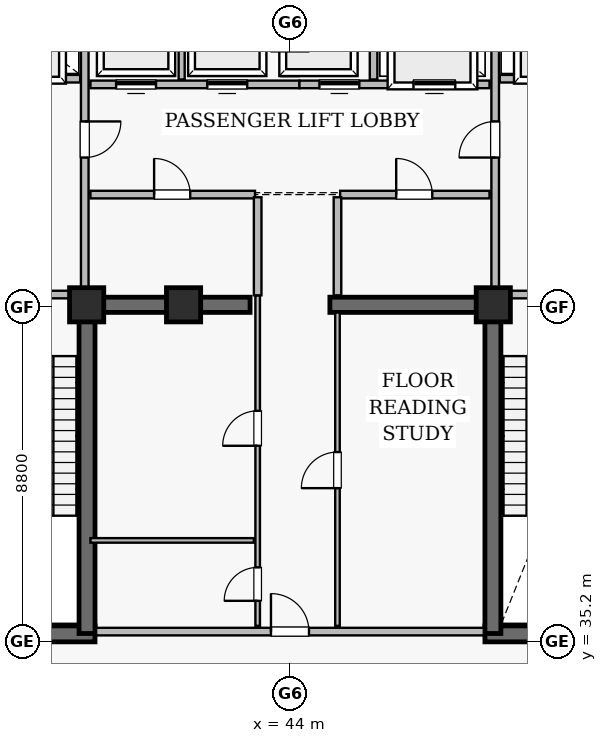
"""IFC4 building model, lengths in metres.
Left out: names, types, materials, properties, quantities, classifications, styles, units other than length and angle.
Written with IfcOpenShell. Run it as: python <this file> out.ifc"""

import sys

from ifc_helpers import new_model, si_unit, direction, frame, frame_2d, origin, origin_2d, place, context, subcontext, project, spatial, rectangle, extrude, element, fill, save


model = new_model("IFC4")
c1 = context("Model", 3, precision=1e-05, world=origin(), true_north=direction((0.0, 1.0)))
c2 = subcontext(c1, "Body", "Model", "MODEL_VIEW")
j1 = project(units=[si_unit("LENGTHUNIT", "METRE"), si_unit("PLANEANGLEUNIT", "RADIAN")], contexts=[c1])
p1 = place(None, origin())
s1 = spatial("IfcSite", under=j1, at=p1, CompositionType="ELEMENT")
p2 = place(p1, origin())
s2 = spatial("IfcBuilding", under=s1, at=p2, CompositionType="ELEMENT")
p3 = place(p2, frame((0.0, 0.0, 289.6)))
s3 = spatial("IfcBuildingStorey", under=s2, at=p3, CompositionType="ELEMENT", Elevation=289.6)
for number, where, z_axis, x_axis in (
    (1, (35.18, 35.39, 0.0), (0.0, 0.0, 1.0), (1.0, 0.0, 0.0)),
    (2, (49.13, 35.39, 0.0), (0.0, 0.0, 1.0), (1.0, 0.0, 0.0)),
):
    element("IfcWall", number, at=place(p3, frame(where, z_axis=z_axis, x_axis=x_axis)), inside=s3, PredefinedType="SHEAR", context=c2, shape_type="SweptSolid", body=[
        extrude(rectangle(XDim=3.69, YDim=0.42, at=frame_2d((1.845, 0.0))), origin(), (0.0, 0.0, 1.0), 5.51),
    ])
for number, where, z_axis, x_axis in (
    (3, (38.66, 35.4, 0.0), (0.0, 0.0, 1.0), (0.0, 1.0, 0.0)),
    (4, (49.34, 35.4, 0.0), (0.0, 0.0, 1.0), (0.0, 1.0, 0.0)),
):
    element("IfcWall", number, at=place(p3, frame(where, z_axis=z_axis, x_axis=x_axis)), inside=s3, PredefinedType="SHEAR", context=c2, shape_type="SweptSolid", body=[
        extrude(rectangle(XDim=8.95, YDim=0.42, at=frame_2d((4.475, 0.0))), origin(), (0.0, 0.0, 1.0), 5.51),
    ])
p4 = place(p3, frame((44.0, 50.1, 0.0), z_axis=(0.0, 0.0, 1.0), x_axis=(0.0, 1.0, 0.0)))
e5 = element("IfcWall", 5, at=p4, inside=s3, PredefinedType="SHEAR", context=c2, shape_type="SweptSolid", body=[
    extrude(rectangle(XDim=2.1, YDim=0.4, at=frame_2d((1.05, 0.0))), origin(), (0.0, 0.0, 1.0), 5.51),
])
for number, where, z_axis, x_axis in (
    (6, (38.75, 44.05, 0.0), (0.0, 0.0, 1.0), (1.0, 0.0, 0.0)),
    (7, (45.05, 44.05, 0.0), (0.0, 0.0, 1.0), (1.0, 0.0, 0.0)),
):
    element("IfcWall", number, at=place(p3, frame(where, z_axis=z_axis, x_axis=x_axis)), inside=s3, PredefinedType="SHEAR", context=c2, shape_type="SweptSolid", body=[
        extrude(rectangle(XDim=4.2, YDim=0.4, at=frame_2d((2.1, 0.0))), origin(), (0.0, 0.0, 1.0), 5.51),
    ])
for number, where, z_axis, x_axis in (
    (8, (38.65, 44.05, 0.0), (0.0, 0.0, 1.0), (1.0, 0.0, 0.0)),
    (9, (49.35, 44.05, 0.0), (0.0, 0.0, 1.0), (1.0, 0.0, 0.0)),
    (10, (41.2, 44.05, 0.0), (0.0, 0.0, 1.0), (1.0, 0.0, 0.0)),
):
    element("IfcColumn", number, at=place(p3, frame(where, z_axis=z_axis, x_axis=x_axis)), inside=s3, PredefinedType="COLUMN", context=c2, shape_type="SweptSolid", body=[
        extrude(rectangle(XDim=0.9, YDim=0.9, at=origin_2d()), origin(), (0.0, 0.0, 1.0), 5.8),
    ])
p5 = place(p3, frame((38.9, 35.45, 0.0), z_axis=(0.0, 0.0, 1.0), x_axis=(1.0, 0.0, 0.0)))
e11 = element("IfcWall", 11, at=p5, inside=s3, PredefinedType="SOLIDWALL", context=c2, shape_type="SweptSolid", body=[
    extrude(rectangle(XDim=10.2, YDim=0.2, at=frame_2d((5.1, 0.0))), origin(), (0.0, 0.0, 1.0), 5.51),
])
p6 = place(p5, frame((4.6, 0.0, 0.0)))
e12 = element("IfcOpeningElement", 12, at=p6, cuts=e11, PredefinedType="OPENING", context=c2, shape_type="SweptSolid", body=[
    extrude(rectangle(XDim=1.0, YDim=2.15, at=frame_2d((0.5, 1.075))), frame((0.0, 0.11, 0.0), z_axis=(0.0, -1.0, 0.0), x_axis=(1.0, 0.0, 0.0)), (0.0, 0.0, 1.0), 0.22),
])
p7 = place(p3, frame((43.15, 35.6, 0.0), z_axis=(0.0, 0.0, 1.0), x_axis=(0.0, 1.0, 0.0)))
e13 = element("IfcWall", 13, at=p7, inside=s3, PredefinedType="PARTITIONING", context=c2, shape_type="SweptSolid", body=[
    extrude(rectangle(XDim=8.7, YDim=0.12, at=frame_2d((4.35, 0.0))), origin(), (0.0, 0.0, 1.0), 5.51),
])
p8 = place(p7, frame((0.66, 0.0, 0.0)))
e14 = element("IfcOpeningElement", 14, at=p8, cuts=e13, PredefinedType="OPENING", context=c2, shape_type="SweptSolid", body=[
    extrude(rectangle(XDim=0.88, YDim=2.1, at=frame_2d((0.44, 1.05))), frame((0.0, 0.07, 0.0), z_axis=(0.0, -1.0, 0.0), x_axis=(1.0, 0.0, 0.0)), (0.0, 0.0, 1.0), 0.14),
])
p9 = place(p7, frame((4.74, 0.0, 0.0)))
e15 = element("IfcOpeningElement", 15, at=p9, cuts=e13, PredefinedType="OPENING", context=c2, shape_type="SweptSolid", body=[
    extrude(rectangle(XDim=0.92, YDim=2.1, at=frame_2d((0.46, 1.05))), frame((0.0, 0.07, 0.0), z_axis=(0.0, -1.0, 0.0), x_axis=(1.0, 0.0, 0.0)), (0.0, 0.0, 1.0), 0.14),
])
p10 = place(p3, frame((45.25, 35.6, 0.0), z_axis=(0.0, 0.0, 1.0), x_axis=(0.0, 1.0, 0.0)))
e16 = element("IfcWall", 16, at=p10, inside=s3, PredefinedType="PARTITIONING", context=c2, shape_type="SweptSolid", body=[
    extrude(rectangle(XDim=8.25, YDim=0.12, at=frame_2d((4.125, 0.0))), origin(), (0.0, 0.0, 1.0), 5.51),
])
p11 = place(p10, frame((3.625, 0.0, 0.0)))
e17 = element("IfcOpeningElement", 17, at=p11, cuts=e16, PredefinedType="OPENING", context=c2, shape_type="SweptSolid", body=[
    extrude(rectangle(XDim=0.95, YDim=2.1, at=frame_2d((0.475, 1.05))), frame((0.0, 0.07, 0.0), z_axis=(0.0, -1.0, 0.0), x_axis=(1.0, 0.0, 0.0)), (0.0, 0.0, 1.0), 0.14),
])
p12 = place(p3, frame((38.6, 44.5, 0.0), z_axis=(0.0, 0.0, 1.0), x_axis=(0.0, 1.0, 0.0)))
e18 = element("IfcWall", 18, at=p12, inside=s3, PredefinedType="SOLIDWALL", context=c2, shape_type="SweptSolid", body=[
    extrude(rectangle(XDim=7.92, YDim=0.2, at=frame_2d((3.96, 0.0))), origin(), (0.0, 0.0, 1.0), 5.51),
])
p13 = place(p12, frame((3.425, 0.0, 0.0)))
e19 = element("IfcOpeningElement", 19, at=p13, cuts=e18, PredefinedType="OPENING", context=c2, shape_type="SweptSolid", body=[
    extrude(rectangle(XDim=0.95, YDim=2.15, at=frame_2d((0.475, 1.075))), frame((0.0, 0.11, 0.0), z_axis=(0.0, -1.0, 0.0), x_axis=(1.0, 0.0, 0.0)), (0.0, 0.0, 1.0), 0.22),
])
p14 = place(p3, frame((49.4, 44.5, 0.0), z_axis=(0.0, 0.0, 1.0), x_axis=(0.0, 1.0, 0.0)))
e20 = element("IfcWall", 20, at=p14, inside=s3, PredefinedType="SOLIDWALL", context=c2, shape_type="SweptSolid", body=[
    extrude(rectangle(XDim=7.92, YDim=0.2, at=frame_2d((3.96, 0.0))), origin(), (0.0, 0.0, 1.0), 4.598),
])
p15 = place(p14, frame((3.425, 0.0, 0.0)))
e21 = element("IfcOpeningElement", 21, at=p15, cuts=e20, PredefinedType="OPENING", context=c2, shape_type="SweptSolid", body=[
    extrude(rectangle(XDim=0.95, YDim=2.15, at=frame_2d((0.475, 1.075))), frame((0.0, 0.11, 0.0), z_axis=(0.0, -1.0, 0.0), x_axis=(1.0, 0.0, 0.0)), (0.0, 0.0, 1.0), 0.22),
])
p16 = place(p3, frame((38.75, 49.85, 0.0), z_axis=(0.0, 0.0, 1.0), x_axis=(1.0, 0.0, 0.0)))
e22 = element("IfcWall", 22, at=p16, inside=s3, PredefinedType="SOLIDWALL", context=c2, shape_type="SweptSolid", body=[
    extrude(rectangle(XDim=5.5, YDim=0.2, at=frame_2d((2.75, 0.0))), origin(), (0.0, 0.0, 1.0), 5.51),
])
p17 = place(p16, frame((0.675, 0.0, 0.0)))
e23 = element("IfcOpeningElement", 23, at=p17, cuts=e22, PredefinedType="OPENING", context=c2, shape_type="SweptSolid", body=[
    extrude(rectangle(XDim=1.05, YDim=2.15, at=frame_2d((0.525, 1.075))), frame((0.0, 0.11, 0.0), z_axis=(0.0, -1.0, 0.0), x_axis=(1.0, 0.0, 0.0)), (0.0, 0.0, 1.0), 0.22),
])
p18 = place(p16, frame((3.075, 0.0, 0.0)))
e24 = element("IfcOpeningElement", 24, at=p18, cuts=e22, PredefinedType="OPENING", context=c2, shape_type="SweptSolid", body=[
    extrude(rectangle(XDim=1.05, YDim=2.15, at=frame_2d((0.525, 1.075))), frame((0.0, 0.11, 0.0), z_axis=(0.0, -1.0, 0.0), x_axis=(1.0, 0.0, 0.0)), (0.0, 0.0, 1.0), 0.22),
])
p19 = place(p3, frame((44.25, 49.85, 0.0), z_axis=(0.0, 0.0, 1.0), x_axis=(1.0, 0.0, 0.0)))
e25 = element("IfcWall", 25, at=p19, inside=s3, PredefinedType="SOLIDWALL", context=c2, shape_type="SweptSolid", body=[
    extrude(rectangle(XDim=5.0, YDim=0.2, at=frame_2d((2.5, 0.0))), origin(), (0.0, 0.0, 1.0), 4.598),
])
p20 = place(p19, frame((0.525, 0.0, 0.0)))
e26 = element("IfcOpeningElement", 26, at=p20, cuts=e25, PredefinedType="OPENING", context=c2, shape_type="SweptSolid", body=[
    extrude(rectangle(XDim=1.05, YDim=2.15, at=frame_2d((0.525, 1.075))), frame((0.0, 0.11, 0.0), z_axis=(0.0, -1.0, 0.0), x_axis=(1.0, 0.0, 0.0)), (0.0, 0.0, 1.0), 0.22),
])
p21 = place(p19, frame((3.0, 0.0, 0.0)))
e27 = element("IfcOpeningElement", 27, at=p21, cuts=e25, PredefinedType="OPENING", context=c2, shape_type="SweptSolid", body=[
    extrude(rectangle(XDim=1.1, YDim=2.15, at=frame_2d((0.55, 1.075))), frame((0.0, 0.11, 0.0), z_axis=(0.0, -1.0, 0.0), x_axis=(1.0, 0.0, 0.0)), (0.0, 0.0, 1.0), 0.22),
])
p22 = place(p3, frame((38.75, 46.95, 0.0), z_axis=(0.0, 0.0, 1.0), x_axis=(1.0, 0.0, 0.0)))
e28 = element("IfcWall", 28, at=p22, inside=s3, PredefinedType="SOLIDWALL", context=c2, shape_type="SweptSolid", body=[
    extrude(rectangle(XDim=4.33, YDim=0.2, at=frame_2d((2.165, 0.0))), origin(), (0.0, 0.0, 1.0), 5.51),
])
p23 = place(p22, frame((1.675, 0.0, 0.0)))
e29 = element("IfcOpeningElement", 29, at=p23, cuts=e28, PredefinedType="OPENING", context=c2, shape_type="SweptSolid", body=[
    extrude(rectangle(XDim=0.95, YDim=2.1, at=frame_2d((0.475, 1.05))), frame((0.0, 0.11, 0.0), z_axis=(0.0, -1.0, 0.0), x_axis=(1.0, 0.0, 0.0)), (0.0, 0.0, 1.0), 0.22),
])
p24 = place(p3, frame((45.32, 46.95, 0.0), z_axis=(0.0, 0.0, 1.0), x_axis=(1.0, 0.0, 0.0)))
e30 = element("IfcWall", 30, at=p24, inside=s3, PredefinedType="SOLIDWALL", context=c2, shape_type="SweptSolid", body=[
    extrude(rectangle(XDim=3.93, YDim=0.2, at=frame_2d((1.965, 0.0))), origin(), (0.0, 0.0, 1.0), 4.598),
])
p25 = place(p24, frame((1.475, 0.0, 0.0)))
e31 = element("IfcOpeningElement", 31, at=p25, cuts=e30, PredefinedType="OPENING", context=c2, shape_type="SweptSolid", body=[
    extrude(rectangle(XDim=0.95, YDim=2.1, at=frame_2d((0.475, 1.05))), frame((0.0, 0.11, 0.0), z_axis=(0.0, -1.0, 0.0), x_axis=(1.0, 0.0, 0.0)), (0.0, 0.0, 1.0), 0.22),
])
p26 = place(p3, frame((35.65, 44.32, 0.0), z_axis=(0.0, 0.0, 1.0), x_axis=(1.0, 0.0, 0.0)))
e32 = element("IfcWall", 32, at=p26, inside=s3, PredefinedType="SOLIDWALL", context=c2, shape_type="SweptSolid", body=[
    extrude(rectangle(XDim=2.8, YDim=0.2, at=frame_2d((1.4, 0.0))), origin(), (0.0, 0.0, 1.0), 5.51),
])
p27 = place(p26, frame((0.9, 0.0, 0.0)))
e33 = element("IfcOpeningElement", 33, at=p27, cuts=e32, PredefinedType="OPENING", context=c2, shape_type="SweptSolid", body=[
    extrude(rectangle(XDim=1.0, YDim=2.15, at=frame_2d((0.5, 1.075))), frame((0.0, 0.11, 0.0), z_axis=(0.0, -1.0, 0.0), x_axis=(1.0, 0.0, 0.0)), (0.0, 0.0, 1.0), 0.22),
])
p28 = place(p3, frame((49.55, 44.32, 0.0), z_axis=(0.0, 0.0, 1.0), x_axis=(1.0, 0.0, 0.0)))
e34 = element("IfcWall", 34, at=p28, inside=s3, PredefinedType="SOLIDWALL", context=c2, shape_type="SweptSolid", body=[
    extrude(rectangle(XDim=2.8, YDim=0.2, at=frame_2d((1.4, 0.0))), origin(), (0.0, 0.0, 1.0), 4.598),
])
p29 = place(p28, frame((0.9, 0.0, 0.0)))
e35 = element("IfcOpeningElement", 35, at=p29, cuts=e34, PredefinedType="OPENING", context=c2, shape_type="SweptSolid", body=[
    extrude(rectangle(XDim=1.0, YDim=2.15, at=frame_2d((0.5, 1.075))), frame((0.0, 0.11, 0.0), z_axis=(0.0, -1.0, 0.0), x_axis=(1.0, 0.0, 0.0)), (0.0, 0.0, 1.0), 0.22),
])
p30 = place(p3, frame((35.68, 50.0, 0.0), z_axis=(0.0, 0.0, 1.0), x_axis=(1.0, 0.0, 0.0)))
e36 = element("IfcWall", 36, at=p30, inside=s3, PredefinedType="SOLIDWALL", context=c2, shape_type="SweptSolid", body=[
    extrude(rectangle(XDim=2.8, YDim=0.2, at=frame_2d((1.4, 0.0))), origin(), (0.0, 0.0, 1.0), 5.51),
])
p31 = place(p30, frame((0.85, 0.0, 0.0)))
e37 = element("IfcOpeningElement", 37, at=p31, cuts=e36, PredefinedType="OPENING", context=c2, shape_type="SweptSolid", body=[
    extrude(rectangle(XDim=1.1, YDim=2.15, at=frame_2d((0.55, 1.075))), frame((0.0, 0.11, 0.0), z_axis=(0.0, -1.0, 0.0), x_axis=(1.0, 0.0, 0.0)), (0.0, 0.0, 1.0), 0.22),
])
p32 = place(p3, frame((49.52, 50.0, 0.0), z_axis=(0.0, 0.0, 1.0), x_axis=(1.0, 0.0, 0.0)))
e38 = element("IfcWall", 38, at=p32, inside=s3, PredefinedType="SOLIDWALL", context=c2, shape_type="SweptSolid", body=[
    extrude(rectangle(XDim=2.8, YDim=0.2, at=frame_2d((1.4, 0.0))), origin(), (0.0, 0.0, 1.0), 5.51),
])
p33 = place(p32, frame((0.85, 0.0, 0.0)))
e39 = element("IfcOpeningElement", 39, at=p33, cuts=e38, PredefinedType="OPENING", context=c2, shape_type="SweptSolid", body=[
    extrude(rectangle(XDim=1.1, YDim=2.15, at=frame_2d((0.55, 1.075))), frame((0.0, 0.11, 0.0), z_axis=(0.0, -1.0, 0.0), x_axis=(1.0, 0.0, 0.0)), (0.0, 0.0, 1.0), 0.22),
])
p34 = place(p3, frame((38.75, 37.85, 0.0), z_axis=(0.0, 0.0, 1.0), x_axis=(1.0, 0.0, 0.0)))
e40 = element("IfcWall", 40, at=p34, inside=s3, PredefinedType="PARTITIONING", context=c2, shape_type="SweptSolid", body=[
    extrude(rectangle(XDim=4.3, YDim=0.12, at=frame_2d((2.15, 0.0))), origin(), (0.0, 0.0, 1.0), 5.51),
])
for number, where, z_axis, x_axis in (
    (41, (43.15, 44.3, 0.0), (0.0, 0.0, 1.0), (0.0, 1.0, 0.0)),
    (42, (45.25, 44.3, 0.0), (0.0, 0.0, 1.0), (0.0, 1.0, 0.0)),
):
    element("IfcWall", number, at=place(p3, frame(where, z_axis=z_axis, x_axis=x_axis)), inside=s3, PredefinedType="SOLIDWALL", context=c2, shape_type="SweptSolid", body=[
        extrude(rectangle(XDim=2.58, YDim=0.2, at=frame_2d((1.29, 0.0))), origin(), (0.0, 0.0, 1.0), 5.51),
    ])
p35 = place(p3, frame((41.15, 49.98, 0.0), z_axis=(0.0, 0.0, 1.0), x_axis=(0.0, 1.0, 0.0)))
e43 = element("IfcWall", 43, at=p35, inside=s3, PredefinedType="SOLIDWALL", context=c2, shape_type="SweptSolid", body=[
    extrude(rectangle(XDim=2.37, YDim=0.16, at=frame_2d((1.185, 0.0))), origin(), (0.0, 0.0, 1.0), 5.51),
])
p36 = place(p3, frame((46.2, 49.98, 0.0), z_axis=(0.0, 0.0, 1.0), x_axis=(0.0, 1.0, 0.0)))
e44 = element("IfcWall", 44, at=p36, inside=s3, PredefinedType="SOLIDWALL", context=c2, shape_type="SweptSolid", body=[
    extrude(rectangle(XDim=2.37, YDim=0.2, at=frame_2d((1.185, 0.0))), origin(), (0.0, 0.0, 1.0), 5.51),
])
p37 = place(p13, frame((0.95, 0.0, 0.0), z_axis=(0.0, 0.0, 1.0), x_axis=(-1.0, 0.0, 0.0)))
e45 = element("IfcDoor", 45, at=p37, inside=s3, OperationType="SINGLE_SWING_RIGHT", PredefinedType="DOOR", context=c2, shape_type="SweptSolid", body=[
    extrude(rectangle(XDim=0.95, YDim=2.15, at=frame_2d((0.475, 1.075))), frame((0.0, 0.025, 0.0), z_axis=(0.0, -1.0, 0.0), x_axis=(1.0, 0.0, 0.0)), (0.0, 0.0, 1.0), 0.05),
])
fill(e19, e45)
p38 = place(p15, origin())
e46 = element("IfcDoor", 46, at=p38, inside=s3, OperationType="SINGLE_SWING_LEFT", PredefinedType="DOOR", context=c2, shape_type="SweptSolid", body=[
    extrude(rectangle(XDim=0.95, YDim=2.15, at=frame_2d((0.475, 1.075))), frame((0.0, 0.025, 0.0), z_axis=(0.0, -1.0, 0.0), x_axis=(1.0, 0.0, 0.0)), (0.0, 0.0, 1.0), 0.05),
])
fill(e21, e46)
p39 = place(p6, origin())
e47 = element("IfcDoor", 47, at=p39, inside=s3, OperationType="SINGLE_SWING_LEFT", PredefinedType="DOOR", context=c2, shape_type="SweptSolid", body=[
    extrude(rectangle(XDim=1.0, YDim=2.15, at=frame_2d((0.5, 1.075))), frame((0.0, 0.025, 0.0), z_axis=(0.0, -1.0, 0.0), x_axis=(1.0, 0.0, 0.0)), (0.0, 0.0, 1.0), 0.05),
])
fill(e12, e47)
p40 = place(p17, origin())
e48 = element("IfcDoor", 48, at=p40, inside=s3, OperationType="SLIDING_TO_LEFT", PredefinedType="DOOR", context=c2, shape_type="SweptSolid", body=[
    extrude(rectangle(XDim=1.05, YDim=2.15, at=frame_2d((0.525, 1.075))), frame((0.0, 0.025, 0.0), z_axis=(0.0, -1.0, 0.0), x_axis=(1.0, 0.0, 0.0)), (0.0, 0.0, 1.0), 0.05),
])
fill(e23, e48)
p41 = place(p18, origin())
e49 = element("IfcDoor", 49, at=p41, inside=s3, OperationType="SLIDING_TO_LEFT", PredefinedType="DOOR", context=c2, shape_type="SweptSolid", body=[
    extrude(rectangle(XDim=1.05, YDim=2.15, at=frame_2d((0.525, 1.075))), frame((0.0, 0.025, 0.0), z_axis=(0.0, -1.0, 0.0), x_axis=(1.0, 0.0, 0.0)), (0.0, 0.0, 1.0), 0.05),
])
fill(e24, e49)
p42 = place(p20, origin())
e50 = element("IfcDoor", 50, at=p42, inside=s3, OperationType="SLIDING_TO_LEFT", PredefinedType="DOOR", context=c2, shape_type="SweptSolid", body=[
    extrude(rectangle(XDim=1.05, YDim=2.15, at=frame_2d((0.525, 1.075))), frame((0.0, 0.025, 0.0), z_axis=(0.0, -1.0, 0.0), x_axis=(1.0, 0.0, 0.0)), (0.0, 0.0, 1.0), 0.05),
])
fill(e26, e50)
p43 = place(p21, origin())
e51 = element("IfcDoor", 51, at=p43, inside=s3, OperationType="SLIDING_TO_LEFT", PredefinedType="DOOR", context=c2, shape_type="SweptSolid", body=[
    extrude(rectangle(XDim=1.1, YDim=2.15, at=frame_2d((0.55, 1.075))), frame((0.0, 0.025, 0.0), z_axis=(0.0, -1.0, 0.0), x_axis=(1.0, 0.0, 0.0)), (0.0, 0.0, 1.0), 0.05),
])
fill(e27, e51)
p44 = place(p23, origin())
e52 = element("IfcDoor", 52, at=p44, inside=s3, OperationType="SINGLE_SWING_LEFT", PredefinedType="DOOR", context=c2, shape_type="SweptSolid", body=[
    extrude(rectangle(XDim=0.95, YDim=2.1, at=frame_2d((0.475, 1.05))), frame((0.0, 0.025, 0.0), z_axis=(0.0, -1.0, 0.0), x_axis=(1.0, 0.0, 0.0)), (0.0, 0.0, 1.0), 0.05),
])
fill(e29, e52)
p45 = place(p25, origin())
e53 = element("IfcDoor", 53, at=p45, inside=s3, OperationType="SINGLE_SWING_LEFT", PredefinedType="DOOR", context=c2, shape_type="SweptSolid", body=[
    extrude(rectangle(XDim=0.95, YDim=2.1, at=frame_2d((0.475, 1.05))), frame((0.0, 0.025, 0.0), z_axis=(0.0, -1.0, 0.0), x_axis=(1.0, 0.0, 0.0)), (0.0, 0.0, 1.0), 0.05),
])
fill(e31, e53)
p46 = place(p8, origin())
e54 = element("IfcDoor", 54, at=p46, inside=s3, OperationType="SINGLE_SWING_LEFT", PredefinedType="DOOR", context=c2, shape_type="SweptSolid", body=[
    extrude(rectangle(XDim=0.88, YDim=2.1, at=frame_2d((0.44, 1.05))), frame((0.0, 0.025, 0.0), z_axis=(0.0, -1.0, 0.0), x_axis=(1.0, 0.0, 0.0)), (0.0, 0.0, 1.0), 0.05),
])
fill(e14, e54)
p47 = place(p9, origin())
e55 = element("IfcDoor", 55, at=p47, inside=s3, OperationType="SINGLE_SWING_LEFT", PredefinedType="DOOR", context=c2, shape_type="SweptSolid", body=[
    extrude(rectangle(XDim=0.92, YDim=2.1, at=frame_2d((0.46, 1.05))), frame((0.0, 0.025, 0.0), z_axis=(0.0, -1.0, 0.0), x_axis=(1.0, 0.0, 0.0)), (0.0, 0.0, 1.0), 0.05),
])
fill(e15, e55)
p48 = place(p11, origin())
e56 = element("IfcDoor", 56, at=p48, inside=s3, OperationType="SINGLE_SWING_LEFT", PredefinedType="DOOR", context=c2, shape_type="SweptSolid", body=[
    extrude(rectangle(XDim=0.95, YDim=2.1, at=frame_2d((0.475, 1.05))), frame((0.0, 0.025, 0.0), z_axis=(0.0, -1.0, 0.0), x_axis=(1.0, 0.0, 0.0)), (0.0, 0.0, 1.0), 0.05),
])
fill(e17, e56)
save(model, sys.argv[1])
